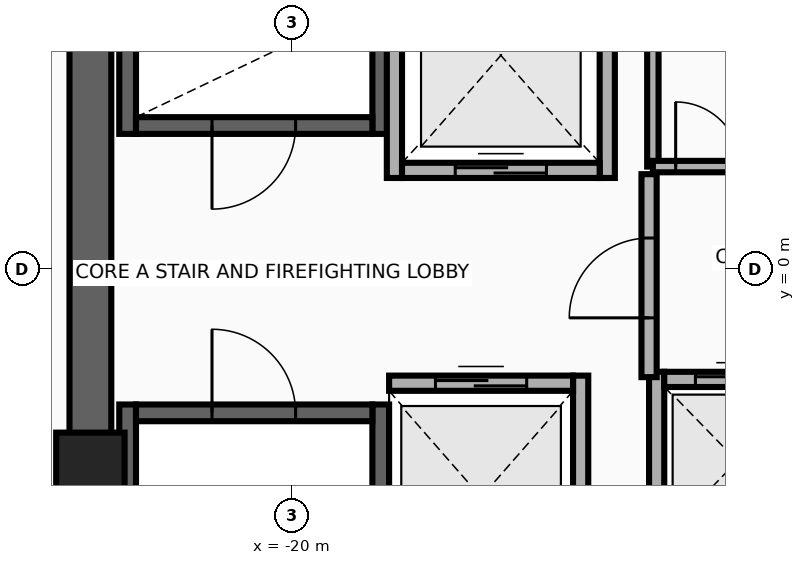
"""IFC4 building model, lengths in metres.
Left out: names, types, materials, properties, quantities, classifications, styles, units other than length and angle.
Written with IfcOpenShell. Run it as: python <this file> out.ifc"""

import sys

from ifc_helpers import new_model, si_unit, direction, frame, frame_2d, origin, origin_2d, place, context, subcontext, project, spatial, rectangle, extrude, source, transform, mapped, element, fill, save


model = new_model("IFC4")
c1 = context("Model", 3, precision=1e-05, world=origin(), true_north=direction((0.0, 1.0)))
c2 = subcontext(c1, "Body", "Model", "MODEL_VIEW")
j1 = project(units=[si_unit("LENGTHUNIT", "METRE"), si_unit("PLANEANGLEUNIT", "RADIAN")], contexts=[c1])
p1 = place(None, origin())
s1 = spatial("IfcSite", under=j1, at=p1, CompositionType="ELEMENT")
p2 = place(p1, origin())
s2 = spatial("IfcBuilding", under=s1, at=p2, CompositionType="ELEMENT")
p3 = place(p2, frame((0.0, 0.0, 233.5)))
s3 = spatial("IfcBuildingStorey", under=s2, at=p3, CompositionType="ELEMENT", Elevation=233.5)
for number, where, z_axis, x_axis in (
    (1, (-22.16, 1.78, 0.0), (0.0, 0.0, 1.0), (0.0, 1.0, 0.0)),
    (2, (-18.83, 1.78, 0.0), (0.0, 0.0, 1.0), (0.0, 1.0, 0.0)),
):
    element("IfcWall", number, at=place(p3, frame(where, z_axis=z_axis, x_axis=x_axis)), inside=s3, PredefinedType="SHEAR", context=c2, shape_type="SweptSolid", body=[
        extrude(rectangle(XDim=8.745, YDim=0.22, at=frame_2d((4.373, 0.0))), origin(), (0.0, 0.0, 1.0), 3.26),
    ])
p4 = place(p3, frame((-22.05, 1.89, 0.0), z_axis=(0.0, 0.0, 1.0), x_axis=(1.0, 0.0, 0.0)))
e3 = element("IfcWall", 3, at=p4, inside=s3, PredefinedType="SHEAR", context=c2, shape_type="SweptSolid", body=[
    extrude(rectangle(XDim=3.11, YDim=0.22, at=frame_2d((1.555, 0.0))), origin(), (0.0, 0.0, 1.0), 3.26),
])
p5 = place(p4, frame((1.0, 0.0, 0.0)))
e4 = element("IfcOpeningElement", 4, at=p5, cuts=e3, PredefinedType="OPENING", context=c2, shape_type="SweptSolid", body=[
    extrude(rectangle(XDim=1.1, YDim=2.15, at=frame_2d((0.55, 1.075))), frame((0.0, 0.125, 0.0), z_axis=(0.0, -1.0, 0.0), x_axis=(1.0, 0.0, 0.0)), (0.0, 0.0, 1.0), 0.25),
])
for number, where, z_axis, x_axis in (
    (5, (-22.16, -10.525, 0.0), (0.0, 0.0, 1.0), (0.0, 1.0, 0.0)),
    (6, (-18.83, -10.525, 0.0), (0.0, 0.0, 1.0), (0.0, 1.0, 0.0)),
):
    element("IfcWall", number, at=place(p3, frame(where, z_axis=z_axis, x_axis=x_axis)), inside=s3, PredefinedType="SHEAR", context=c2, shape_type="SweptSolid", body=[
        extrude(rectangle(XDim=8.745, YDim=0.22, at=frame_2d((4.373, 0.0))), origin(), (0.0, 0.0, 1.0), 3.26),
    ])
p6 = place(p3, frame((-22.05, -1.89, 0.0), z_axis=(0.0, 0.0, 1.0), x_axis=(1.0, 0.0, 0.0)))
e7 = element("IfcWall", 7, at=p6, inside=s3, PredefinedType="SHEAR", context=c2, shape_type="SweptSolid", body=[
    extrude(rectangle(XDim=3.11, YDim=0.22, at=frame_2d((1.555, 0.0))), origin(), (0.0, 0.0, 1.0), 3.26),
])
p7 = place(p6, frame((1.0, 0.0, 0.0)))
e8 = element("IfcOpeningElement", 8, at=p7, cuts=e7, PredefinedType="OPENING", context=c2, shape_type="SweptSolid", body=[
    extrude(rectangle(XDim=1.1, YDim=2.15, at=frame_2d((0.55, 1.075))), frame((0.0, 0.125, 0.0), z_axis=(0.0, -1.0, 0.0), x_axis=(1.0, 0.0, 0.0)), (0.0, 0.0, 1.0), 0.25),
])
p8 = place(p3, frame((-22.65, -11.075, 0.0), z_axis=(0.0, 0.0, 1.0), x_axis=(0.0, 1.0, 0.0)))
e9 = element("IfcWall", 9, at=p8, inside=s3, PredefinedType="SHEAR", context=c2, shape_type="SweptSolid", body=[
    extrude(rectangle(XDim=22.15, YDim=0.55, at=frame_2d((11.075, 0.0))), origin(), (0.0, 0.0, 1.0), 3.26),
])
m1 = source(origin(), c2, "Body", "SweptSolid", [
    extrude(rectangle(XDim=0.9, YDim=0.9, at=origin_2d()), origin(), (0.0, 0.0, 1.0), 3.5),
])
p9 = place(p3, frame((-22.65, -2.6, 0.0), z_axis=(0.0, 0.0, 1.0), x_axis=(1.0, 0.0, 0.0)))
e10 = element("IfcColumn", 10, at=p9, inside=s3, PredefinedType="COLUMN", context=c2, shape_type="MappedRepresentation", body=[
    mapped(m1, transform((0.0, 0.0, 0.0), x_axis=(1.0, 0.0, 0.0), y_axis=(0.0, 1.0, 0.0), z_axis=(0.0, 0.0, 1.0), scale=1.0)),
])
for number, where, z_axis, x_axis in (
    (11, (-18.65, 1.2, 0.0), (0.0, 0.0, 1.0), (0.0, 1.0, 0.0)),
    (12, (-15.85, 1.2, 0.0), (0.0, 0.0, 1.0), (0.0, 1.0, 0.0)),
):
    element("IfcWall", number, at=place(p3, frame(where, z_axis=z_axis, x_axis=x_axis)), inside=s3, PredefinedType="MOVABLE", context=c2, shape_type="SweptSolid", body=[
        extrude(rectangle(XDim=3.225, YDim=0.2, at=frame_2d((1.613, 0.0))), origin(), (0.0, 0.0, 1.0), 3.26),
    ])
p10 = place(p3, frame((-18.55, 1.3, 0.0), z_axis=(0.0, 0.0, 1.0), x_axis=(1.0, 0.0, 0.0)))
e13 = element("IfcWall", 13, at=p10, inside=s3, PredefinedType="MOVABLE", context=c2, shape_type="SweptSolid", body=[
    extrude(rectangle(XDim=2.6, YDim=0.2, at=frame_2d((1.3, 0.0))), origin(), (0.0, 0.0, 1.0), 3.26),
])
p11 = place(p10, frame((0.7, 0.0, 0.0)))
e14 = element("IfcOpeningElement", 14, at=p11, cuts=e13, PredefinedType="OPENING", context=c2, shape_type="SweptSolid", body=[
    extrude(rectangle(XDim=1.2, YDim=2.1, at=frame_2d((0.6, 1.05))), frame((0.0, 0.115, 0.0), z_axis=(0.0, -1.0, 0.0), x_axis=(1.0, 0.0, 0.0)), (0.0, 0.0, 1.0), 0.23),
])
p12 = place(p3, frame((-16.2, -4.6, 0.0), z_axis=(0.0, 0.0, 1.0), x_axis=(0.0, 1.0, 0.0)))
e15 = element("IfcWall", 15, at=p12, inside=s3, PredefinedType="MOVABLE", context=c2, shape_type="SweptSolid", body=[
    extrude(rectangle(XDim=3.2, YDim=0.2, at=frame_2d((1.6, 0.0))), origin(), (0.0, 0.0, 1.0), 3.26),
])
p13 = place(p3, frame((-18.72, -1.5, 0.0), z_axis=(0.0, 0.0, 1.0), x_axis=(1.0, 0.0, 0.0)))
e16 = element("IfcWall", 16, at=p13, inside=s3, PredefinedType="MOVABLE", context=c2, shape_type="SweptSolid", body=[
    extrude(rectangle(XDim=2.42, YDim=0.2, at=frame_2d((1.21, 0.0))), origin(), (0.0, 0.0, 1.0), 3.26),
])
p14 = place(p13, frame((0.61, 0.0, 0.0)))
e17 = element("IfcOpeningElement", 17, at=p14, cuts=e16, PredefinedType="OPENING", context=c2, shape_type="SweptSolid", body=[
    extrude(rectangle(XDim=1.2, YDim=2.1, at=frame_2d((0.6, 1.05))), frame((0.0, 0.115, 0.0), z_axis=(0.0, -1.0, 0.0), x_axis=(1.0, 0.0, 0.0)), (0.0, 0.0, 1.0), 0.23),
])
p15 = place(p3, frame((-15.2, -3.7, 0.0), z_axis=(0.0, 0.0, 1.0), x_axis=(0.0, 1.0, 0.0)))
e18 = element("IfcWall", 18, at=p15, inside=s3, PredefinedType="MOVABLE", context=c2, shape_type="SweptSolid", body=[
    extrude(rectangle(XDim=2.35, YDim=0.2, at=frame_2d((1.175, 0.0))), origin(), (0.0, 0.0, 1.0), 3.26),
])
p16 = place(p3, frame((-15.1, -1.45, 0.0), z_axis=(0.0, 0.0, 1.0), x_axis=(1.0, 0.0, 0.0)))
e19 = element("IfcWall", 19, at=p16, inside=s3, PredefinedType="MOVABLE", context=c2, shape_type="SweptSolid", body=[
    extrude(rectangle(XDim=1.92, YDim=0.2, at=frame_2d((0.96, 0.0))), origin(), (0.0, 0.0, 1.0), 3.26),
])
p17 = place(p16, frame((0.41, 0.0, 0.0)))
e20 = element("IfcOpeningElement", 20, at=p17, cuts=e19, PredefinedType="OPENING", context=c2, shape_type="SweptSolid", body=[
    extrude(rectangle(XDim=1.1, YDim=2.1, at=frame_2d((0.55, 1.05))), frame((0.0, 0.115, 0.0), z_axis=(0.0, -1.0, 0.0), x_axis=(1.0, 0.0, 0.0)), (0.0, 0.0, 1.0), 0.23),
])
p18 = place(p3, frame((-15.3, -1.42, 0.0), z_axis=(0.0, 0.0, 1.0), x_axis=(0.0, 1.0, 0.0)))
e21 = element("IfcWall", 21, at=p18, inside=s3, PredefinedType="PARTITIONING", context=c2, shape_type="SweptSolid", body=[
    extrude(rectangle(XDim=2.67, YDim=0.2, at=frame_2d((1.335, 0.0))), origin(), (0.0, 0.0, 1.0), 3.26),
])
p19 = place(p18, frame((0.78, 0.0, 0.0)))
e22 = element("IfcOpeningElement", 22, at=p19, cuts=e21, PredefinedType="OPENING", context=c2, shape_type="SweptSolid", body=[
    extrude(rectangle(XDim=1.05, YDim=2.15, at=frame_2d((0.525, 1.075))), frame((0.0, 0.115, 0.0), z_axis=(0.0, -1.0, 0.0), x_axis=(1.0, 0.0, 0.0)), (0.0, 0.0, 1.0), 0.23),
])
p20 = place(p3, frame((-15.25, 1.35, 0.0), z_axis=(0.0, 0.0, 1.0), x_axis=(0.0, 1.0, 0.0)))
e23 = element("IfcWall", 23, at=p20, inside=s3, PredefinedType="PARTITIONING", context=c2, shape_type="SweptSolid", body=[
    extrude(rectangle(XDim=1.95, YDim=0.15, at=frame_2d((0.975, 0.0))), origin(), (0.0, 0.0, 1.0), 3.26),
])
p21 = place(p3, frame((-15.25, 1.35, 0.0), z_axis=(0.0, 0.0, 1.0), x_axis=(1.0, 0.0, 0.0)))
e24 = element("IfcWall", 24, at=p21, inside=s3, PredefinedType="PARTITIONING", context=c2, shape_type="SweptSolid", body=[
    extrude(rectangle(XDim=2.1, YDim=0.15, at=frame_2d((1.05, 0.0))), origin(), (0.0, 0.0, 1.0), 3.26),
])
p22 = place(p21, frame((0.3, 0.0, 0.0)))
e25 = element("IfcOpeningElement", 25, at=p22, cuts=e24, PredefinedType="OPENING", context=c2, shape_type="SweptSolid", body=[
    extrude(rectangle(XDim=0.85, YDim=2.05, at=frame_2d((0.425, 1.025))), frame((0.0, 0.09, 0.0), z_axis=(0.0, -1.0, 0.0), x_axis=(1.0, 0.0, 0.0)), (0.0, 0.0, 1.0), 0.18),
])
p23 = place(p11, origin())
e26 = element("IfcDoor", 26, at=p23, inside=s3, OperationType="DOUBLE_DOOR_SLIDING", PredefinedType="DOOR", context=c2, shape_type="SweptSolid", body=[
    extrude(rectangle(XDim=1.2, YDim=2.1, at=frame_2d((0.6, 1.05))), frame((0.0, 0.025, 0.0), z_axis=(0.0, -1.0, 0.0), x_axis=(1.0, 0.0, 0.0)), (0.0, 0.0, 1.0), 0.05),
])
fill(e14, e26)
p24 = place(p14, origin())
e27 = element("IfcDoor", 27, at=p24, inside=s3, OperationType="DOUBLE_DOOR_SLIDING", PredefinedType="DOOR", context=c2, shape_type="SweptSolid", body=[
    extrude(rectangle(XDim=1.2, YDim=2.1, at=frame_2d((0.6, 1.05))), frame((0.0, 0.025, 0.0), z_axis=(0.0, -1.0, 0.0), x_axis=(1.0, 0.0, 0.0)), (0.0, 0.0, 1.0), 0.05),
])
fill(e17, e27)
p25 = place(p17, origin())
e28 = element("IfcDoor", 28, at=p25, inside=s3, OperationType="DOUBLE_DOOR_SLIDING", PredefinedType="DOOR", context=c2, shape_type="SweptSolid", body=[
    extrude(rectangle(XDim=1.1, YDim=2.1, at=frame_2d((0.55, 1.05))), frame((0.0, 0.025, 0.0), z_axis=(0.0, -1.0, 0.0), x_axis=(1.0, 0.0, 0.0)), (0.0, 0.0, 1.0), 0.05),
])
fill(e20, e28)
p26 = place(p19, origin())
e29 = element("IfcDoor", 29, at=p26, inside=s3, OperationType="SINGLE_SWING_RIGHT", PredefinedType="DOOR", context=c2, shape_type="SweptSolid", body=[
    extrude(rectangle(XDim=1.05, YDim=2.15, at=frame_2d((0.525, 1.075))), frame((0.0, 0.025, 0.0), z_axis=(0.0, -1.0, 0.0), x_axis=(1.0, 0.0, 0.0)), (0.0, 0.0, 1.0), 0.05),
])
fill(e22, e29)
p27 = place(p5, frame((1.1, 0.0, 0.0), z_axis=(0.0, 0.0, 1.0), x_axis=(-1.0, 0.0, 0.0)))
e30 = element("IfcDoor", 30, at=p27, inside=s3, OperationType="SINGLE_SWING_LEFT", PredefinedType="DOOR", context=c2, shape_type="SweptSolid", body=[
    extrude(rectangle(XDim=1.1, YDim=2.15, at=frame_2d((0.55, 1.075))), frame((0.0, 0.025, 0.0), z_axis=(0.0, -1.0, 0.0), x_axis=(1.0, 0.0, 0.0)), (0.0, 0.0, 1.0), 0.05),
])
fill(e4, e30)
p28 = place(p7, origin())
e31 = element("IfcDoor", 31, at=p28, inside=s3, OperationType="SINGLE_SWING_RIGHT", PredefinedType="DOOR", context=c2, shape_type="SweptSolid", body=[
    extrude(rectangle(XDim=1.1, YDim=2.15, at=frame_2d((0.55, 1.075))), frame((0.0, 0.025, 0.0), z_axis=(0.0, -1.0, 0.0), x_axis=(1.0, 0.0, 0.0)), (0.0, 0.0, 1.0), 0.05),
])
fill(e8, e31)
p29 = place(p22, origin())
e32 = element("IfcDoor", 32, at=p29, inside=s3, OperationType="SINGLE_SWING_LEFT", PredefinedType="DOOR", context=c2, shape_type="SweptSolid", body=[
    extrude(rectangle(XDim=0.85, YDim=2.05, at=frame_2d((0.425, 1.025))), frame((0.0, 0.025, 0.0), z_axis=(0.0, -1.0, 0.0), x_axis=(1.0, 0.0, 0.0)), (0.0, 0.0, 1.0), 0.05),
])
fill(e25, e32)
save(model, sys.argv[1])
